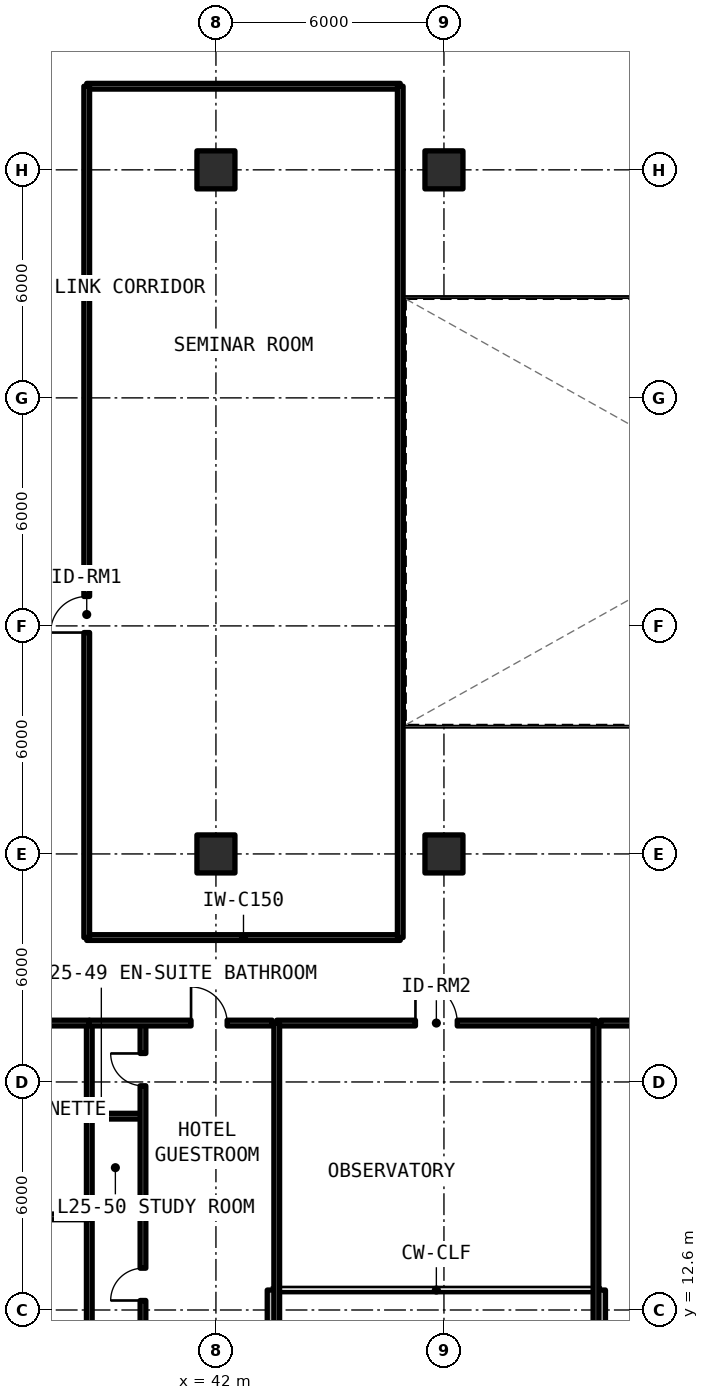
"""IFC4 building model, lengths in metres.
Left out: names, types, materials, properties, quantities, classifications, styles, units other than length and angle.
Written with IfcOpenShell. Run it as: python <this file> out.ifc"""

import sys

from ifc_helpers import new_model, si_unit, direction, frame, frame_2d, origin, origin_2d, place, context, subcontext, project, spatial, rectangle, extrude, element, fill, save


model = new_model("IFC4")
c1 = context("Model", 3, precision=1e-05, world=origin(), true_north=direction((0.0, 1.0)))
c2 = subcontext(c1, "Body", "Model", "MODEL_VIEW")
j1 = project(units=[si_unit("LENGTHUNIT", "METRE"), si_unit("PLANEANGLEUNIT", "RADIAN")], contexts=[c1])
p1 = place(None, origin())
s1 = spatial("IfcSite", under=j1, at=p1, CompositionType="ELEMENT")
p2 = place(p1, origin())
s2 = spatial("IfcBuilding", under=s1, at=p2, CompositionType="ELEMENT")
p3 = place(p2, frame((0.0, 0.0, 92.07)))
s3 = spatial("IfcBuildingStorey", under=s2, at=p3, CompositionType="ELEMENT", Elevation=92.07)
for number, where, z_axis, x_axis in (
    (1, (42.0, 24.6, 0.0), (0.0, 0.0, 1.0), (1.0, 0.0, 0.0)),
    (2, (42.0, 42.6, 0.0), (0.0, 0.0, 1.0), (1.0, 0.0, 0.0)),
    (3, (48.0, 24.6, 0.0), (0.0, 0.0, 1.0), (1.0, 0.0, 0.0)),
    (4, (48.0, 42.6, 0.0), (0.0, 0.0, 1.0), (1.0, 0.0, 0.0)),
):
    element("IfcColumn", number, at=place(p3, frame(where, z_axis=z_axis, x_axis=x_axis)), inside=s3, PredefinedType="COLUMN", context=c2, shape_type="SweptSolid", body=[
        extrude(rectangle(XDim=1.0, YDim=1.0, at=origin_2d()), origin(), (0.0, 0.0, 1.0), 3.3),
    ])
for number, where, z_axis, x_axis in (
    (5, (43.475, 9.725, 0.0), (0.0, 0.0, 1.0), (0.0, 1.0, 0.0)),
    (6, (52.125, 13.125, 0.0), (0.0, 0.0, 1.0), (0.0, -1.0, 0.0)),
):
    element("IfcWall", number, at=place(p3, frame(where, z_axis=z_axis, x_axis=x_axis)), inside=s3, PredefinedType="SOLIDWALL", context=c2, shape_type="SweptSolid", body=[
        extrude(rectangle(XDim=3.4, YDim=0.25, at=frame_2d((1.7, 0.0))), origin(), (0.0, 0.0, 1.0), 3.08),
    ])
for number, where, z_axis, x_axis in (
    (7, (38.6, 22.4, 0.0), (0.0, 0.0, 1.0), (1.0, 0.0, 0.0)),
    (8, (38.6, 44.8, 0.0), (0.0, 0.0, 1.0), (1.0, 0.0, 0.0)),
):
    element("IfcWall", number, at=place(p3, frame(where, z_axis=z_axis, x_axis=x_axis)), inside=s3, PredefinedType="SOLIDWALL", context=c2, shape_type="SweptSolid", body=[
        extrude(rectangle(XDim=8.25, YDim=0.15, at=frame_2d((4.125, 0.0))), origin(), (0.0, 0.0, 1.0), 2.35),
    ])
p4 = place(p3, frame((38.6, 22.4, 0.0), z_axis=(0.0, 0.0, 1.0), x_axis=(0.0, 1.0, 0.0)))
e9 = element("IfcWall", 9, at=p4, inside=s3, PredefinedType="SOLIDWALL", context=c2, shape_type="SweptSolid", body=[
    extrude(rectangle(XDim=22.4, YDim=0.15, at=frame_2d((11.2, 0.0))), origin(), (0.0, 0.0, 1.0), 2.35),
])
p5 = place(p4, frame((8.025, 0.0, 0.0)))
e10 = element("IfcOpeningElement", 10, at=p5, cuts=e9, PredefinedType="OPENING", context=c2, shape_type="SweptSolid", body=[
    extrude(rectangle(XDim=0.95, YDim=2.15, at=frame_2d((0.475, 1.075))), frame((0.0, 0.085, 0.0), z_axis=(0.0, -1.0, 0.0), x_axis=(1.0, 0.0, 0.0)), (0.0, 0.0, 1.0), 0.17),
])
p6 = place(p3, frame((46.85, 22.4, 0.0), z_axis=(0.0, 0.0, 1.0), x_axis=(0.0, 1.0, 0.0)))
e11 = element("IfcWall", 11, at=p6, inside=s3, PredefinedType="SOLIDWALL", context=c2, shape_type="SweptSolid", body=[
    extrude(rectangle(XDim=22.4, YDim=0.15, at=frame_2d((11.2, 0.0))), origin(), (0.0, 0.0, 1.0), 2.35),
])
p7 = place(p3, frame((43.6, 20.15, 0.0), z_axis=(0.0, 0.0, 1.0), x_axis=(1.0, 0.0, 0.0)))
e12 = element("IfcWall", 12, at=p7, inside=s3, PredefinedType="SOLIDWALL", context=c2, shape_type="SweptSolid", body=[
    extrude(rectangle(XDim=8.4, YDim=0.15, at=frame_2d((4.2, 0.0))), origin(), (0.0, 0.0, 1.0), 2.35),
])
p8 = place(p7, frame((3.65, 0.0, 0.0)))
e13 = element("IfcOpeningElement", 13, at=p8, cuts=e12, PredefinedType="OPENING", context=c2, shape_type="SweptSolid", body=[
    extrude(rectangle(XDim=1.1, YDim=2.15, at=frame_2d((0.55, 1.075))), frame((0.0, 0.085, 0.0), z_axis=(0.0, -1.0, 0.0), x_axis=(1.0, 0.0, 0.0)), (0.0, 0.0, 1.0), 0.17),
])
for number, where, z_axis, x_axis in (
    (14, (43.6, 9.85, 0.0), (0.0, 0.0, 1.0), (0.0, 1.0, 0.0)),
    (15, (52.0, 9.85, 0.0), (0.0, 0.0, 1.0), (0.0, 1.0, 0.0)),
    (16, (38.667, 9.85, 0.0), (0.0, 0.0, 1.0), (0.0, 1.0, 0.0)),
):
    element("IfcWall", number, at=place(p3, frame(where, z_axis=z_axis, x_axis=x_axis)), inside=s3, PredefinedType="SOLIDWALL", context=c2, shape_type="SweptSolid", body=[
        extrude(rectangle(XDim=10.3, YDim=0.15, at=frame_2d((5.15, 0.0))), origin(), (0.0, 0.0, 1.0), 2.35),
    ])
p9 = place(p3, frame((30.468, 15.05, 0.0), z_axis=(0.0, 0.0, 1.0), x_axis=(1.0, 0.0, 0.0)))
e17 = element("IfcWall", 17, at=p9, inside=s3, PredefinedType="PARTITIONING", context=c2, shape_type="SweptSolid", body=[
    extrude(rectangle(XDim=8.199, YDim=0.15, at=frame_2d((4.1, 0.0))), origin(), (0.0, 0.0, 1.0), 2.35),
])
p10 = place(p9, frame((2.882, 0.0, 0.0)))
e18 = element("IfcOpeningElement", 18, at=p10, cuts=e17, PredefinedType="OPENING", context=c2, shape_type="SweptSolid", body=[
    extrude(rectangle(XDim=0.85, YDim=2.1, at=frame_2d((0.425, 1.05))), frame((0.0, 0.085, 0.0), z_axis=(0.0, -1.0, 0.0), x_axis=(1.0, 0.0, 0.0)), (0.0, 0.0, 1.0), 0.17),
])
p11 = place(p9, frame((5.806, 0.0, 0.0)))
e19 = element("IfcOpeningElement", 19, at=p11, cuts=e17, PredefinedType="OPENING", context=c2, shape_type="SweptSolid", body=[
    extrude(rectangle(XDim=0.85, YDim=2.1, at=frame_2d((0.425, 1.05))), frame((0.0, 0.085, 0.0), z_axis=(0.0, -1.0, 0.0), x_axis=(1.0, 0.0, 0.0)), (0.0, 0.0, 1.0), 0.17),
])
p12 = place(p3, frame((30.468, 20.15, 0.0), z_axis=(0.0, 0.0, 1.0), x_axis=(1.0, 0.0, 0.0)))
e20 = element("IfcWall", 20, at=p12, inside=s3, PredefinedType="SOLIDWALL", context=c2, shape_type="SweptSolid", body=[
    extrude(rectangle(XDim=8.199, YDim=0.15, at=frame_2d((4.1, 0.0))), origin(), (0.0, 0.0, 1.0), 2.35),
])
p13 = place(p12, frame((4.84, 0.0, 0.0)))
e21 = element("IfcOpeningElement", 21, at=p13, cuts=e20, PredefinedType="OPENING", context=c2, shape_type="SweptSolid", body=[
    extrude(rectangle(XDim=0.95, YDim=2.15, at=frame_2d((0.475, 1.075))), frame((0.0, 0.085, 0.0), z_axis=(0.0, -1.0, 0.0), x_axis=(1.0, 0.0, 0.0)), (0.0, 0.0, 1.0), 0.17),
])
p14 = place(p3, frame((38.667, 17.7, 0.0), z_axis=(0.0, 0.0, 1.0), x_axis=(1.0, 0.0, 0.0)))
e22 = element("IfcWall", 22, at=p14, inside=s3, PredefinedType="PARTITIONING", context=c2, shape_type="SweptSolid", body=[
    extrude(rectangle(XDim=1.413, YDim=0.15, at=frame_2d((0.707, 0.0))), origin(), (0.0, 0.0, 1.0), 2.35),
])
p15 = place(p3, frame((40.08, 9.85, 0.0), z_axis=(0.0, 0.0, 1.0), x_axis=(0.0, 1.0, 0.0)))
e23 = element("IfcWall", 23, at=p15, inside=s3, PredefinedType="PARTITIONING", context=c2, shape_type="SweptSolid", body=[
    extrude(rectangle(XDim=10.3, YDim=0.15, at=frame_2d((5.15, 0.0))), origin(), (0.0, 0.0, 1.0), 2.35),
])
p16 = place(p15, frame((3.0, 0.0, 0.0)))
e24 = element("IfcOpeningElement", 24, at=p16, cuts=e23, PredefinedType="OPENING", context=c2, shape_type="SweptSolid", body=[
    extrude(rectangle(XDim=0.85, YDim=2.1, at=frame_2d((0.425, 1.05))), frame((0.0, 0.085, 0.0), z_axis=(0.0, -1.0, 0.0), x_axis=(1.0, 0.0, 0.0)), (0.0, 0.0, 1.0), 0.17),
])
p17 = place(p15, frame((8.65, 0.0, 0.0)))
e25 = element("IfcOpeningElement", 25, at=p17, cuts=e23, PredefinedType="OPENING", context=c2, shape_type="SweptSolid", body=[
    extrude(rectangle(XDim=0.85, YDim=2.1, at=frame_2d((0.425, 1.05))), frame((0.0, 0.085, 0.0), z_axis=(0.0, -1.0, 0.0), x_axis=(1.0, 0.0, 0.0)), (0.0, 0.0, 1.0), 0.17),
])
p18 = place(p3, frame((38.667, 20.15, 0.0), z_axis=(0.0, 0.0, 1.0), x_axis=(1.0, 0.0, 0.0)))
e26 = element("IfcWall", 26, at=p18, inside=s3, PredefinedType="SOLIDWALL", context=c2, shape_type="SweptSolid", body=[
    extrude(rectangle(XDim=4.813, YDim=0.15, at=frame_2d((2.406, 0.0))), origin(), (0.0, 0.0, 1.0), 2.35),
])
p19 = place(p18, frame((2.678, 0.0, 0.0)))
e27 = element("IfcOpeningElement", 27, at=p19, cuts=e26, PredefinedType="OPENING", context=c2, shape_type="SweptSolid", body=[
    extrude(rectangle(XDim=0.95, YDim=2.15, at=frame_2d((0.475, 1.075))), frame((0.0, 0.085, 0.0), z_axis=(0.0, -1.0, 0.0), x_axis=(1.0, 0.0, 0.0)), (0.0, 0.0, 1.0), 0.17),
])
p20 = place(p3, frame((52.12, 20.15, 0.0), z_axis=(0.0, 0.0, 1.0), x_axis=(1.0, 0.0, 0.0)))
e28 = element("IfcWall", 28, at=p20, inside=s3, PredefinedType="SOLIDWALL", context=c2, shape_type="SweptSolid", body=[
    extrude(rectangle(XDim=6.776, YDim=0.15, at=frame_2d((3.388, 0.0))), origin(), (0.0, 0.0, 1.0), 2.35),
])
p21 = place(p20, frame((2.913, 0.0, 0.0)))
e29 = element("IfcOpeningElement", 29, at=p21, cuts=e28, PredefinedType="OPENING", context=c2, shape_type="SweptSolid", body=[
    extrude(rectangle(XDim=0.95, YDim=2.15, at=frame_2d((0.475, 1.075))), frame((0.0, 0.085, 0.0), z_axis=(0.0, -1.0, 0.0), x_axis=(1.0, 0.0, 0.0)), (0.0, 0.0, 1.0), 0.17),
])
p22 = place(p5, origin())
e30 = element("IfcDoor", 30, at=p22, inside=s3, OperationType="SINGLE_SWING_LEFT", PredefinedType="DOOR", context=c2, shape_type="SweptSolid", body=[
    extrude(rectangle(XDim=0.95, YDim=2.15, at=frame_2d((0.475, 1.075))), frame((0.0, 0.025, 0.0), z_axis=(0.0, -1.0, 0.0), x_axis=(1.0, 0.0, 0.0)), (0.0, 0.0, 1.0), 0.05),
])
fill(e10, e30)
p23 = place(p8, origin())
e31 = element("IfcDoor", 31, at=p23, inside=s3, OperationType="SINGLE_SWING_LEFT", PredefinedType="DOOR", context=c2, shape_type="SweptSolid", body=[
    extrude(rectangle(XDim=1.1, YDim=2.15, at=frame_2d((0.55, 1.075))), frame((0.0, 0.025, 0.0), z_axis=(0.0, -1.0, 0.0), x_axis=(1.0, 0.0, 0.0)), (0.0, 0.0, 1.0), 0.05),
])
fill(e13, e31)
p24 = place(p16, origin())
e32 = element("IfcDoor", 32, at=p24, inside=s3, OperationType="SINGLE_SWING_LEFT", PredefinedType="DOOR", context=c2, shape_type="SweptSolid", body=[
    extrude(rectangle(XDim=0.85, YDim=2.1, at=frame_2d((0.425, 1.05))), frame((0.0, 0.025, 0.0), z_axis=(0.0, -1.0, 0.0), x_axis=(1.0, 0.0, 0.0)), (0.0, 0.0, 1.0), 0.05),
])
fill(e24, e32)
p25 = place(p17, origin())
e33 = element("IfcDoor", 33, at=p25, inside=s3, OperationType="SINGLE_SWING_RIGHT", PredefinedType="DOOR", context=c2, shape_type="SweptSolid", body=[
    extrude(rectangle(XDim=0.85, YDim=2.1, at=frame_2d((0.425, 1.05))), frame((0.0, 0.025, 0.0), z_axis=(0.0, -1.0, 0.0), x_axis=(1.0, 0.0, 0.0)), (0.0, 0.0, 1.0), 0.05),
])
fill(e25, e33)
p26 = place(p19, origin())
e34 = element("IfcDoor", 34, at=p26, inside=s3, OperationType="SINGLE_SWING_LEFT", PredefinedType="DOOR", context=c2, shape_type="SweptSolid", body=[
    extrude(rectangle(XDim=0.95, YDim=2.15, at=frame_2d((0.475, 1.075))), frame((0.0, 0.025, 0.0), z_axis=(0.0, -1.0, 0.0), x_axis=(1.0, 0.0, 0.0)), (0.0, 0.0, 1.0), 0.05),
])
fill(e27, e34)
save(model, sys.argv[1])
